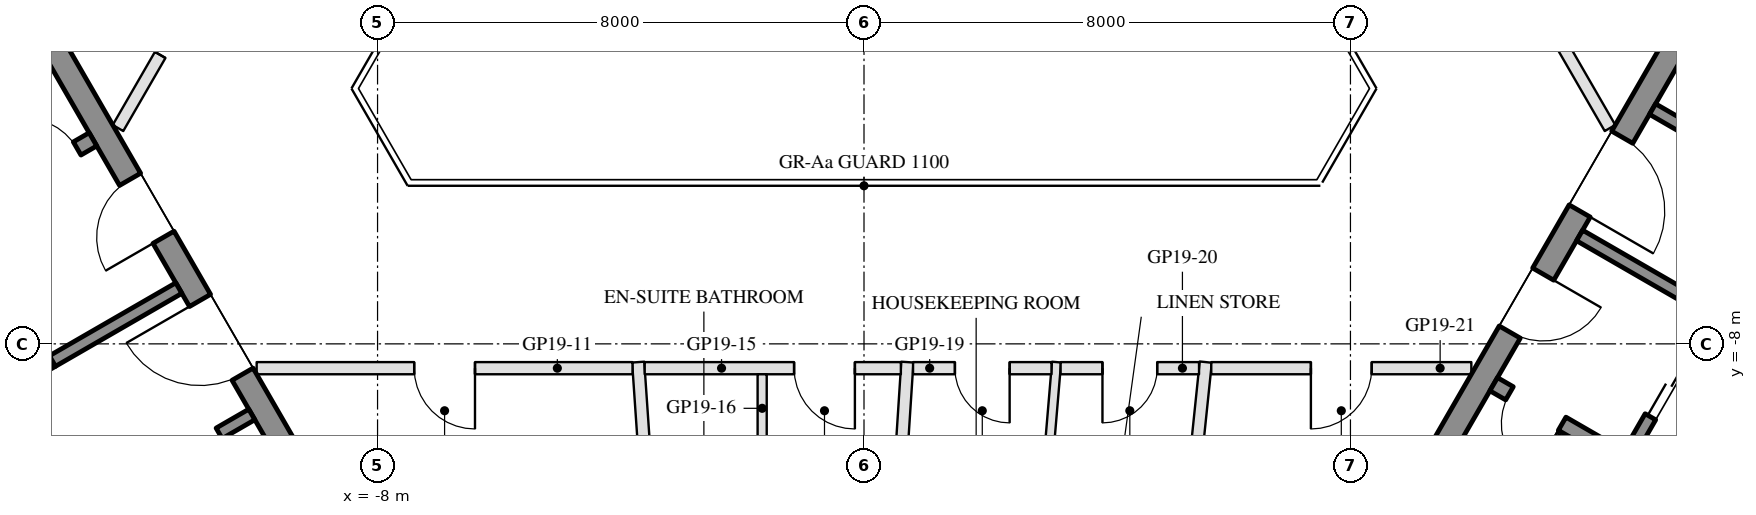
"""IFC4 building model, lengths in metres.
Left out: names, types, materials, properties, quantities, classifications, styles, units other than length and angle.
Written with IfcOpenShell. Run it as: python <this file> out.ifc"""

import sys

from ifc_helpers import new_model, si_unit, direction, frame, frame_2d, origin, place, context, subcontext, project, spatial, rectangle, extrude, element, fill, save


model = new_model("IFC4")
c1 = context("Model", 3, precision=1e-05, world=origin(), true_north=direction((0.0, 1.0)))
c2 = subcontext(c1, "Body", "Model", "MODEL_VIEW")
j1 = project(units=[si_unit("LENGTHUNIT", "METRE"), si_unit("PLANEANGLEUNIT", "RADIAN")], contexts=[c1])
p1 = place(None, origin())
s1 = spatial("IfcSite", under=j1, at=p1, CompositionType="ELEMENT")
p2 = place(p1, origin())
s2 = spatial("IfcBuilding", under=s1, at=p2, CompositionType="ELEMENT")
p3 = place(p2, frame((0.0, 0.0, 202.1)))
s3 = spatial("IfcBuildingStorey", under=s2, at=p3, CompositionType="ELEMENT", Elevation=202.1)
p4 = place(p3, frame((-13.845, -2.22, 0.0), z_axis=(0.0, 0.0, 1.0), x_axis=(0.500004234368, -0.866022959057, 0.0)))
e1 = element("IfcWall", 1, at=p4, inside=s3, PredefinedType="SHEAR", context=c2, shape_type="SweptSolid", body=[
    extrude(rectangle(XDim=10.0, YDim=0.4, at=frame_2d((5.0, 0.0))), origin(), (0.0, 0.0, 1.0), 3.5),
])
p5 = place(p4, frame((3.55, 0.0, 0.0)))
e2 = element("IfcOpeningElement", 2, at=p5, cuts=e1, PredefinedType="OPENING", context=c2, shape_type="SweptSolid", body=[
    extrude(rectangle(XDim=1.1, YDim=2.1, at=frame_2d((0.55, 1.05))), frame((0.0, 0.21, 0.0), z_axis=(0.0, -1.0, 0.0), x_axis=(1.0, 0.0, 0.0)), (0.0, 0.0, 1.0), 0.42),
])
p6 = place(p4, frame((5.85, 0.0, 0.0)))
e3 = element("IfcOpeningElement", 3, at=p6, cuts=e1, PredefinedType="OPENING", context=c2, shape_type="SweptSolid", body=[
    extrude(rectangle(XDim=1.4, YDim=2.1, at=frame_2d((0.7, 1.05))), frame((0.0, 0.21, 0.0), z_axis=(0.0, -1.0, 0.0), x_axis=(1.0, 0.0, 0.0)), (0.0, 0.0, 1.0), 0.42),
])
p7 = place(p3, frame((-12.681, -4.636, 0.0), z_axis=(0.0, 0.0, 1.0), x_axis=(-0.866021702275, -0.500006411147, 0.0)))
e4 = element("IfcWall", 4, at=p7, inside=s3, PredefinedType="SHEAR", context=c2, shape_type="SweptSolid", body=[
    extrude(rectangle(XDim=6.45, YDim=0.25, at=frame_2d((3.225, 0.0))), origin(), (0.0, 0.0, 1.0), 3.5),
])
p8 = place(p7, frame((0.3, 0.0, 0.0)))
e5 = element("IfcOpeningElement", 5, at=p8, cuts=e4, PredefinedType="OPENING", context=c2, shape_type="SweptSolid", body=[
    extrude(rectangle(XDim=1.0, YDim=2.1, at=frame_2d((0.5, 1.05))), frame((0.0, 0.135, 0.0), z_axis=(0.0, -1.0, 0.0), x_axis=(1.0, 0.0, 0.0)), (0.0, 0.0, 1.0), 0.27),
])
p9 = place(p3, frame((-14.783, -5.995, 0.0), z_axis=(0.0, 0.0, 1.0), x_axis=(0.49994636267, -0.866056369097, 0.0)))
e6 = element("IfcWall", 6, at=p9, inside=s3, PredefinedType="SHEAR", context=c2, shape_type="SweptSolid", body=[
    extrude(rectangle(XDim=2.8, YDim=0.2, at=frame_2d((1.4, 0.0))), origin(), (0.0, 0.0, 1.0), 3.5),
])
p10 = place(p9, frame((0.7, 0.0, 0.0)))
e7 = element("IfcOpeningElement", 7, at=p10, cuts=e6, PredefinedType="OPENING", context=c2, shape_type="SweptSolid", body=[
    extrude(rectangle(XDim=1.2, YDim=2.1, at=frame_2d((0.6, 1.05))), frame((0.0, 0.11, 0.0), z_axis=(0.0, -1.0, 0.0), x_axis=(1.0, 0.0, 0.0)), (0.0, 0.0, 1.0), 0.22),
])
p11 = place(p3, frame((-11.268, -7.083, 0.0), z_axis=(0.0, 0.0, 1.0), x_axis=(-0.866050077142, -0.499957262057, 0.0)))
e8 = element("IfcWall", 8, at=p11, inside=s3, PredefinedType="SHEAR", context=c2, shape_type="SweptSolid", body=[
    extrude(rectangle(XDim=2.4, YDim=0.2, at=frame_2d((1.2, 0.0))), origin(), (0.0, 0.0, 1.0), 3.5),
])
p12 = place(p3, frame((-10.068, -9.162, 0.0), z_axis=(0.0, 0.0, 1.0), x_axis=(-0.866032725843, -0.499987317609, 0.0)))
e9 = element("IfcWall", 9, at=p12, inside=s3, PredefinedType="SHEAR", context=c2, shape_type="SweptSolid", body=[
    extrude(rectangle(XDim=10.16, YDim=0.2, at=frame_2d((5.08, 0.0))), origin(), (0.0, 0.0, 1.0), 3.5),
])
p13 = place(p12, frame((0.62, 0.0, 0.0)))
e10 = element("IfcOpeningElement", 10, at=p13, cuts=e9, PredefinedType="OPENING", context=c2, shape_type="SweptSolid", body=[
    extrude(rectangle(XDim=1.1, YDim=2.1, at=frame_2d((0.55, 1.05))), frame((0.0, 0.11, 0.0), z_axis=(0.0, -1.0, 0.0), x_axis=(1.0, 0.0, 0.0)), (0.0, 0.0, 1.0), 0.22),
])
p14 = place(p12, frame((3.16, 0.0, 0.0)))
e11 = element("IfcOpeningElement", 11, at=p14, cuts=e9, PredefinedType="OPENING", context=c2, shape_type="SweptSolid", body=[
    extrude(rectangle(XDim=1.1, YDim=2.1, at=frame_2d((0.55, 1.05))), frame((0.0, 0.11, 0.0), z_axis=(0.0, -1.0, 0.0), x_axis=(1.0, 0.0, 0.0)), (0.0, 0.0, 1.0), 0.22),
])
p15 = place(p12, frame((5.7, 0.0, 0.0)))
e12 = element("IfcOpeningElement", 12, at=p15, cuts=e9, PredefinedType="OPENING", context=c2, shape_type="SweptSolid", body=[
    extrude(rectangle(XDim=1.1, YDim=2.1, at=frame_2d((0.55, 1.05))), frame((0.0, 0.11, 0.0), z_axis=(0.0, -1.0, 0.0), x_axis=(1.0, 0.0, 0.0)), (0.0, 0.0, 1.0), 0.22),
])
p16 = place(p12, frame((8.24, 0.0, 0.0)))
e13 = element("IfcOpeningElement", 13, at=p16, cuts=e9, PredefinedType="OPENING", context=c2, shape_type="SweptSolid", body=[
    extrude(rectangle(XDim=1.1, YDim=2.1, at=frame_2d((0.55, 1.05))), frame((0.0, 0.11, 0.0), z_axis=(0.0, -1.0, 0.0), x_axis=(1.0, 0.0, 0.0)), (0.0, 0.0, 1.0), 0.22),
])
p17 = place(p3, frame((8.845, -10.88, 0.0), z_axis=(0.0, 0.0, 1.0), x_axis=(0.500004234368, 0.866022959057, 0.0)))
e14 = element("IfcWall", 14, at=p17, inside=s3, PredefinedType="SHEAR", context=c2, shape_type="SweptSolid", body=[
    extrude(rectangle(XDim=10.0, YDim=0.4, at=frame_2d((5.0, 0.0))), origin(), (0.0, 0.0, 1.0), 3.5),
])
p18 = place(p17, frame((3.55, 0.0, 0.0)))
e15 = element("IfcOpeningElement", 15, at=p18, cuts=e14, PredefinedType="OPENING", context=c2, shape_type="SweptSolid", body=[
    extrude(rectangle(XDim=1.1, YDim=2.1, at=frame_2d((0.55, 1.05))), frame((0.0, 0.21, 0.0), z_axis=(0.0, -1.0, 0.0), x_axis=(1.0, 0.0, 0.0)), (0.0, 0.0, 1.0), 0.42),
])
p19 = place(p17, frame((5.85, 0.0, 0.0)))
e16 = element("IfcOpeningElement", 16, at=p19, cuts=e14, PredefinedType="OPENING", context=c2, shape_type="SweptSolid", body=[
    extrude(rectangle(XDim=1.4, YDim=2.1, at=frame_2d((0.7, 1.05))), frame((0.0, 0.21, 0.0), z_axis=(0.0, -1.0, 0.0), x_axis=(1.0, 0.0, 0.0)), (0.0, 0.0, 1.0), 0.42),
])
p20 = place(p3, frame((10.356, -8.664, 0.0), z_axis=(0.0, 0.0, 1.0), x_axis=(0.866028629588, -0.499994412703, 0.0)))
e17 = element("IfcWall", 17, at=p20, inside=s3, PredefinedType="SHEAR", context=c2, shape_type="SweptSolid", body=[
    extrude(rectangle(XDim=6.45, YDim=0.25, at=frame_2d((3.225, 0.0))), origin(), (0.0, 0.0, 1.0), 3.5),
])
p21 = place(p20, frame((0.3, 0.0, 0.0)))
e18 = element("IfcOpeningElement", 18, at=p21, cuts=e17, PredefinedType="OPENING", context=c2, shape_type="SweptSolid", body=[
    extrude(rectangle(XDim=1.0, YDim=2.1, at=frame_2d((0.5, 1.05))), frame((0.0, 0.135, 0.0), z_axis=(0.0, -1.0, 0.0), x_axis=(1.0, 0.0, 0.0)), (0.0, 0.0, 1.0), 0.27),
])
p22 = place(p3, frame((12.583, -9.805, 0.0), z_axis=(0.0, 0.0, 1.0), x_axis=(0.49994636267, 0.866056369097, 0.0)))
e19 = element("IfcWall", 19, at=p22, inside=s3, PredefinedType="SHEAR", context=c2, shape_type="SweptSolid", body=[
    extrude(rectangle(XDim=2.8, YDim=0.2, at=frame_2d((1.4, 0.0))), origin(), (0.0, 0.0, 1.0), 3.5),
])
p23 = place(p22, frame((0.7, 0.0, 0.0)))
e20 = element("IfcOpeningElement", 20, at=p23, cuts=e19, PredefinedType="OPENING", context=c2, shape_type="SweptSolid", body=[
    extrude(rectangle(XDim=1.2, YDim=2.1, at=frame_2d((0.6, 1.05))), frame((0.0, 0.11, 0.0), z_axis=(0.0, -1.0, 0.0), x_axis=(1.0, 0.0, 0.0)), (0.0, 0.0, 1.0), 0.22),
])
p24 = place(p3, frame((11.768, -6.217, 0.0), z_axis=(0.0, 0.0, 1.0), x_axis=(0.866050077142, -0.499957262057, 0.0)))
e21 = element("IfcWall", 21, at=p24, inside=s3, PredefinedType="SHEAR", context=c2, shape_type="SweptSolid", body=[
    extrude(rectangle(XDim=2.4, YDim=0.2, at=frame_2d((1.2, 0.0))), origin(), (0.0, 0.0, 1.0), 3.5),
])
p25 = place(p3, frame((12.968, -4.138, 0.0), z_axis=(0.0, 0.0, 1.0), x_axis=(0.866028328073, -0.49999493495, 0.0)))
e22 = element("IfcWall", 22, at=p25, inside=s3, PredefinedType="SHEAR", context=c2, shape_type="SweptSolid", body=[
    extrude(rectangle(XDim=10.16, YDim=0.2, at=frame_2d((5.08, 0.0))), origin(), (0.0, 0.0, 1.0), 3.5),
])
p26 = place(p25, frame((1.99, 0.0, 0.0)))
e23 = element("IfcOpeningElement", 23, at=p26, cuts=e22, PredefinedType="OPENING", context=c2, shape_type="SweptSolid", body=[
    extrude(rectangle(XDim=0.9, YDim=2.1, at=frame_2d((0.45, 1.05))), frame((0.0, 0.11, 0.0), z_axis=(0.0, -1.0, 0.0), x_axis=(1.0, 0.0, 0.0)), (0.0, 0.0, 1.0), 0.22),
])
p27 = place(p25, frame((7.07, 0.0, 0.0)))
e24 = element("IfcOpeningElement", 24, at=p27, cuts=e22, PredefinedType="OPENING", context=c2, shape_type="SweptSolid", body=[
    extrude(rectangle(XDim=0.9, YDim=2.1, at=frame_2d((0.45, 1.05))), frame((0.0, 0.11, 0.0), z_axis=(0.0, -1.0, 0.0), x_axis=(1.0, 0.0, 0.0)), (0.0, 0.0, 1.0), 0.22),
])
p28 = place(p3, frame((-3.022, -18.38, 0.0), z_axis=(0.0, 0.0, 1.0), x_axis=(-0.068480322914, 0.997652467232, 0.0)))
e25 = element("IfcWall", 25, at=p28, inside=s3, PredefinedType="PARTITIONING", context=c2, shape_type="SweptSolid", body=[
    extrude(rectangle(XDim=10.104, YDim=0.2, at=frame_2d((5.052, 0.0))), origin(), (0.0, 0.0, 1.0), 3.06),
])
p29 = place(p3, frame((0.093, -17.855, 0.0), z_axis=(0.0, 0.0, 1.0), x_axis=(0.064789362054, 0.997898962102, 0.0)))
e26 = element("IfcWall", 26, at=p29, inside=s3, PredefinedType="PARTITIONING", context=c2, shape_type="SweptSolid", body=[
    extrude(rectangle(XDim=9.575, YDim=0.2, at=frame_2d((4.788, 0.0))), origin(), (0.0, 0.0, 1.0), 2.95),
])
p30 = place(p3, frame((4.48, -19.28, 0.0), z_axis=(0.0, 0.0, 1.0), x_axis=(0.103348095524, 0.994645248896, 0.0)))
e27 = element("IfcWall", 27, at=p30, inside=s3, PredefinedType="PARTITIONING", context=c2, shape_type="SweptSolid", body=[
    extrude(rectangle(XDim=11.039, YDim=0.2, at=frame_2d((5.52, 0.0))), origin(), (0.0, 0.0, 1.0), 3.06),
])
p31 = place(p3, frame((-3.807, -8.4, 0.0), z_axis=(0.0, 0.0, 1.0), x_axis=(-1.0, 0.0, 0.0)))
e28 = element("IfcWall", 28, at=p31, inside=s3, PredefinedType="PARTITIONING", context=c2, shape_type="SweptSolid", body=[
    extrude(rectangle(XDim=6.181, YDim=0.2, at=frame_2d((3.091, 0.0))), origin(), (0.0, 0.0, 1.0), 2.95),
])
p32 = place(p31, frame((2.591, 0.0, 0.0)))
e29 = element("IfcOpeningElement", 29, at=p32, cuts=e28, PredefinedType="OPENING", context=c2, shape_type="SweptSolid", body=[
    extrude(rectangle(XDim=1.0, YDim=2.1, at=frame_2d((0.5, 1.05))), frame((0.0, 0.11, 0.0), z_axis=(0.0, -1.0, 0.0), x_axis=(1.0, 0.0, 0.0)), (0.0, 0.0, 1.0), 0.22),
])
p33 = place(p3, frame((0.606, -8.4, 0.0), z_axis=(0.0, 0.0, 1.0), x_axis=(-1.0, 0.0, 0.0)))
e30 = element("IfcWall", 30, at=p33, inside=s3, PredefinedType="PARTITIONING", context=c2, shape_type="SweptSolid", body=[
    extrude(rectangle(XDim=4.213, YDim=0.2, at=frame_2d((2.106, 0.0))), origin(), (0.0, 0.0, 1.0), 2.95),
])
p34 = place(p33, frame((0.756, 0.0, 0.0)))
e31 = element("IfcOpeningElement", 31, at=p34, cuts=e30, PredefinedType="OPENING", context=c2, shape_type="SweptSolid", body=[
    extrude(rectangle(XDim=1.0, YDim=2.1, at=frame_2d((0.5, 1.05))), frame((0.0, 0.11, 0.0), z_axis=(0.0, -1.0, 0.0), x_axis=(1.0, 0.0, 0.0)), (0.0, 0.0, 1.0), 0.22),
])
p35 = place(p3, frame((-1.675, -11.3, 0.0), z_axis=(0.0, 0.0, 1.0), x_axis=(0.0, 1.0, 0.0)))
e32 = element("IfcWall", 32, at=p35, inside=s3, PredefinedType="PARTITIONING", context=c2, shape_type="SweptSolid", body=[
    extrude(rectangle(XDim=2.8, YDim=0.15, at=frame_2d((1.4, 0.0))), origin(), (0.0, 0.0, 1.0), 3.55),
])
p36 = place(p35, frame((0.5, 0.0, 0.0)))
e33 = element("IfcOpeningElement", 33, at=p36, cuts=e32, PredefinedType="OPENING", context=c2, shape_type="SweptSolid", body=[
    extrude(rectangle(XDim=0.9, YDim=2.1, at=frame_2d((0.45, 1.05))), frame((0.0, 0.085, 0.0), z_axis=(0.0, -1.0, 0.0), x_axis=(1.0, 0.0, 0.0)), (0.0, 0.0, 1.0), 0.17),
])
p37 = place(p3, frame((2.24, -19.28, 0.0), z_axis=(0.0, 0.0, 1.0), x_axis=(0.084127266942, 0.99645501803, 0.0)))
e34 = element("IfcWall", 34, at=p37, inside=s3, PredefinedType="PARTITIONING", context=c2, shape_type="SweptSolid", body=[
    extrude(rectangle(XDim=11.019, YDim=0.15, at=frame_2d((5.51, 0.0))), origin(), (0.0, 0.0, 1.0), 3.06),
])
p38 = place(p3, frame((3.083, -8.4, 0.0), z_axis=(0.0, 0.0, 1.0), x_axis=(-1.0, 0.0, 0.0)))
e35 = element("IfcWall", 35, at=p38, inside=s3, PredefinedType="PARTITIONING", context=c2, shape_type="SweptSolid", body=[
    extrude(rectangle(XDim=2.277, YDim=0.2, at=frame_2d((1.138, 0.0))), origin(), (0.0, 0.0, 1.0), 3.55),
])
p39 = place(p38, frame((0.688, 0.0, 0.0)))
e36 = element("IfcOpeningElement", 36, at=p39, cuts=e35, PredefinedType="OPENING", context=c2, shape_type="SweptSolid", body=[
    extrude(rectangle(XDim=0.9, YDim=2.1, at=frame_2d((0.45, 1.05))), frame((0.0, 0.11, 0.0), z_axis=(0.0, -1.0, 0.0), x_axis=(1.0, 0.0, 0.0)), (0.0, 0.0, 1.0), 0.22),
])
p40 = place(p3, frame((5.51, -8.4, 0.0), z_axis=(0.0, 0.0, 1.0), x_axis=(-1.0, 0.0, 0.0)))
e37 = element("IfcWall", 37, at=p40, inside=s3, PredefinedType="PARTITIONING", context=c2, shape_type="SweptSolid", body=[
    extrude(rectangle(XDim=2.277, YDim=0.2, at=frame_2d((1.138, 0.0))), origin(), (0.0, 0.0, 1.0), 2.95),
])
p41 = place(p40, frame((0.688, 0.0, 0.0)))
e38 = element("IfcOpeningElement", 38, at=p41, cuts=e37, PredefinedType="OPENING", context=c2, shape_type="SweptSolid", body=[
    extrude(rectangle(XDim=0.9, YDim=2.1, at=frame_2d((0.45, 1.05))), frame((0.0, 0.11, 0.0), z_axis=(0.0, -1.0, 0.0), x_axis=(1.0, 0.0, 0.0)), (0.0, 0.0, 1.0), 0.22),
])
p42 = place(p3, frame((9.988, -8.4, 0.0), z_axis=(0.0, 0.0, 1.0), x_axis=(-1.0, 0.0, 0.0)))
e39 = element("IfcWall", 39, at=p42, inside=s3, PredefinedType="PARTITIONING", context=c2, shape_type="SweptSolid", body=[
    extrude(rectangle(XDim=4.277, YDim=0.2, at=frame_2d((2.139, 0.0))), origin(), (0.0, 0.0, 1.0), 2.95),
])
p43 = place(p42, frame((1.639, 0.0, 0.0)))
e40 = element("IfcOpeningElement", 40, at=p43, cuts=e39, PredefinedType="OPENING", context=c2, shape_type="SweptSolid", body=[
    extrude(rectangle(XDim=1.0, YDim=2.1, at=frame_2d((0.5, 1.05))), frame((0.0, 0.11, 0.0), z_axis=(0.0, -1.0, 0.0), x_axis=(1.0, 0.0, 0.0)), (0.0, 0.0, 1.0), 0.22),
])
p44 = place(p3, frame((10.225, -0.909, 0.0), z_axis=(0.0, 0.0, 1.0), x_axis=(0.500011931275, -0.86601851515, 0.0)))
e41 = element("IfcWall", 41, at=p44, inside=s3, PredefinedType="PARTITIONING", context=c2, shape_type="SweptSolid", body=[
    extrude(rectangle(XDim=4.088, YDim=0.2, at=frame_2d((2.044, 0.0))), origin(), (0.0, 0.0, 1.0), 2.95),
])
p45 = place(p44, frame((1.544, 0.0, 0.0)))
e42 = element("IfcOpeningElement", 42, at=p45, cuts=e41, PredefinedType="OPENING", context=c2, shape_type="SweptSolid", body=[
    extrude(rectangle(XDim=1.0, YDim=2.1, at=frame_2d((0.5, 1.05))), frame((0.0, 0.11, 0.0), z_axis=(0.0, -1.0, 0.0), x_axis=(1.0, 0.0, 0.0)), (0.0, 0.0, 1.0), 0.22),
])
p46 = place(p3, frame((-12.269, -4.45, 0.0), z_axis=(0.0, 0.0, 1.0), x_axis=(0.500019063067, 0.866014397438, 0.0)))
e43 = element("IfcWall", 43, at=p46, inside=s3, PredefinedType="PARTITIONING", context=c2, shape_type="SweptSolid", body=[
    extrude(rectangle(XDim=3.776, YDim=0.2, at=frame_2d((1.888, 0.0))), origin(), (0.0, 0.0, 1.0), 2.95),
])
p47 = place(p46, frame((1.388, 0.0, 0.0)))
e44 = element("IfcOpeningElement", 44, at=p47, cuts=e43, PredefinedType="OPENING", context=c2, shape_type="SweptSolid", body=[
    extrude(rectangle(XDim=1.0, YDim=2.1, at=frame_2d((0.5, 1.05))), frame((0.0, 0.11, 0.0), z_axis=(0.0, -1.0, 0.0), x_axis=(1.0, 0.0, 0.0)), (0.0, 0.0, 1.0), 0.22),
])
p48 = place(p13, origin())
e45 = element("IfcDoor", 45, at=p48, inside=s3, OperationType="DOUBLE_DOOR_SLIDING", PredefinedType="DOOR", context=c2, shape_type="SweptSolid", body=[
    extrude(rectangle(XDim=1.1, YDim=2.1, at=frame_2d((0.55, 1.05))), frame((0.0, 0.025, 0.0), z_axis=(0.0, -1.0, 0.0), x_axis=(1.0, 0.0, 0.0)), (0.0, 0.0, 1.0), 0.05),
])
fill(e10, e45)
p49 = place(p5, frame((1.1, 0.0, 0.0), z_axis=(0.0, 0.0, 1.0), x_axis=(-1.0, 0.0, 0.0)))
e46 = element("IfcDoor", 46, at=p49, inside=s3, OperationType="SINGLE_SWING_LEFT", PredefinedType="DOOR", context=c2, shape_type="SweptSolid", body=[
    extrude(rectangle(XDim=1.1, YDim=2.1, at=frame_2d((0.55, 1.05))), frame((0.0, 0.025, 0.0), z_axis=(0.0, -1.0, 0.0), x_axis=(1.0, 0.0, 0.0)), (0.0, 0.0, 1.0), 0.05),
])
fill(e2, e46)
p50 = place(p6, frame((1.4, 0.0, 0.0), z_axis=(0.0, 0.0, 1.0), x_axis=(-1.0, 0.0, 0.0)))
e47 = element("IfcDoor", 47, at=p50, inside=s3, OperationType="DOUBLE_DOOR_SINGLE_SWING", PredefinedType="DOOR", context=c2, shape_type="SweptSolid", body=[
    extrude(rectangle(XDim=1.4, YDim=2.1, at=frame_2d((0.7, 1.05))), frame((0.0, 0.025, 0.0), z_axis=(0.0, -1.0, 0.0), x_axis=(1.0, 0.0, 0.0)), (0.0, 0.0, 1.0), 0.05),
])
fill(e3, e47)
p51 = place(p8, frame((1.0, 0.0, 0.0), z_axis=(0.0, 0.0, 1.0), x_axis=(-1.0, 0.0, 0.0)))
e48 = element("IfcDoor", 48, at=p51, inside=s3, OperationType="SINGLE_SWING_LEFT", PredefinedType="DOOR", context=c2, shape_type="SweptSolid", body=[
    extrude(rectangle(XDim=1.0, YDim=2.1, at=frame_2d((0.5, 1.05))), frame((0.0, 0.025, 0.0), z_axis=(0.0, -1.0, 0.0), x_axis=(1.0, 0.0, 0.0)), (0.0, 0.0, 1.0), 0.05),
])
fill(e5, e48)
p52 = place(p23, origin())
e49 = element("IfcDoor", 49, at=p52, inside=s3, OperationType="DOUBLE_DOOR_SLIDING", PredefinedType="DOOR", context=c2, shape_type="SweptSolid", body=[
    extrude(rectangle(XDim=1.2, YDim=2.1, at=frame_2d((0.6, 1.05))), frame((0.0, 0.025, 0.0), z_axis=(0.0, -1.0, 0.0), x_axis=(1.0, 0.0, 0.0)), (0.0, 0.0, 1.0), 0.05),
])
fill(e20, e49)
p53 = place(p18, frame((1.1, 0.0, 0.0), z_axis=(0.0, 0.0, 1.0), x_axis=(-1.0, 0.0, 0.0)))
e50 = element("IfcDoor", 50, at=p53, inside=s3, OperationType="SINGLE_SWING_LEFT", PredefinedType="DOOR", context=c2, shape_type="SweptSolid", body=[
    extrude(rectangle(XDim=1.1, YDim=2.1, at=frame_2d((0.55, 1.05))), frame((0.0, 0.025, 0.0), z_axis=(0.0, -1.0, 0.0), x_axis=(1.0, 0.0, 0.0)), (0.0, 0.0, 1.0), 0.05),
])
fill(e15, e50)
p54 = place(p19, frame((1.4, 0.0, 0.0), z_axis=(0.0, 0.0, 1.0), x_axis=(-1.0, 0.0, 0.0)))
e51 = element("IfcDoor", 51, at=p54, inside=s3, OperationType="DOUBLE_DOOR_SINGLE_SWING", PredefinedType="DOOR", context=c2, shape_type="SweptSolid", body=[
    extrude(rectangle(XDim=1.4, YDim=2.1, at=frame_2d((0.7, 1.05))), frame((0.0, 0.025, 0.0), z_axis=(0.0, -1.0, 0.0), x_axis=(1.0, 0.0, 0.0)), (0.0, 0.0, 1.0), 0.05),
])
fill(e16, e51)
p55 = place(p21, frame((1.0, 0.0, 0.0), z_axis=(0.0, 0.0, 1.0), x_axis=(-1.0, 0.0, 0.0)))
e52 = element("IfcDoor", 52, at=p55, inside=s3, OperationType="SINGLE_SWING_LEFT", PredefinedType="DOOR", context=c2, shape_type="SweptSolid", body=[
    extrude(rectangle(XDim=1.0, YDim=2.1, at=frame_2d((0.5, 1.05))), frame((0.0, 0.025, 0.0), z_axis=(0.0, -1.0, 0.0), x_axis=(1.0, 0.0, 0.0)), (0.0, 0.0, 1.0), 0.05),
])
fill(e18, e52)
p56 = place(p32, origin())
e53 = element("IfcDoor", 53, at=p56, inside=s3, OperationType="SINGLE_SWING_LEFT", PredefinedType="DOOR", context=c2, shape_type="SweptSolid", body=[
    extrude(rectangle(XDim=1.0, YDim=2.1, at=frame_2d((0.5, 1.05))), frame((0.0, 0.025, 0.0), z_axis=(0.0, -1.0, 0.0), x_axis=(1.0, 0.0, 0.0)), (0.0, 0.0, 1.0), 0.05),
])
fill(e29, e53)
p57 = place(p34, origin())
e54 = element("IfcDoor", 54, at=p57, inside=s3, OperationType="SINGLE_SWING_LEFT", PredefinedType="DOOR", context=c2, shape_type="SweptSolid", body=[
    extrude(rectangle(XDim=1.0, YDim=2.1, at=frame_2d((0.5, 1.05))), frame((0.0, 0.025, 0.0), z_axis=(0.0, -1.0, 0.0), x_axis=(1.0, 0.0, 0.0)), (0.0, 0.0, 1.0), 0.05),
])
fill(e31, e54)
p58 = place(p39, origin())
e55 = element("IfcDoor", 55, at=p58, inside=s3, OperationType="SINGLE_SWING_LEFT", PredefinedType="DOOR", context=c2, shape_type="SweptSolid", body=[
    extrude(rectangle(XDim=0.9, YDim=2.1, at=frame_2d((0.45, 1.05))), frame((0.0, 0.025, 0.0), z_axis=(0.0, -1.0, 0.0), x_axis=(1.0, 0.0, 0.0)), (0.0, 0.0, 1.0), 0.05),
])
fill(e36, e55)
p59 = place(p41, origin())
e56 = element("IfcDoor", 56, at=p59, inside=s3, OperationType="SINGLE_SWING_RIGHT", PredefinedType="DOOR", context=c2, shape_type="SweptSolid", body=[
    extrude(rectangle(XDim=0.9, YDim=2.1, at=frame_2d((0.45, 1.05))), frame((0.0, 0.025, 0.0), z_axis=(0.0, -1.0, 0.0), x_axis=(1.0, 0.0, 0.0)), (0.0, 0.0, 1.0), 0.05),
])
fill(e38, e56)
p60 = place(p43, origin())
e57 = element("IfcDoor", 57, at=p60, inside=s3, OperationType="SINGLE_SWING_RIGHT", PredefinedType="DOOR", context=c2, shape_type="SweptSolid", body=[
    extrude(rectangle(XDim=1.0, YDim=2.1, at=frame_2d((0.5, 1.05))), frame((0.0, 0.025, 0.0), z_axis=(0.0, -1.0, 0.0), x_axis=(1.0, 0.0, 0.0)), (0.0, 0.0, 1.0), 0.05),
])
fill(e40, e57)
p61 = place(p47, origin())
e58 = element("IfcDoor", 58, at=p61, inside=s3, OperationType="SINGLE_SWING_RIGHT", PredefinedType="DOOR", context=c2, shape_type="SweptSolid", body=[
    extrude(rectangle(XDim=1.0, YDim=2.1, at=frame_2d((0.5, 1.05))), frame((0.0, 0.025, 0.0), z_axis=(0.0, -1.0, 0.0), x_axis=(1.0, 0.0, 0.0)), (0.0, 0.0, 1.0), 0.05),
])
fill(e44, e58)
save(model, sys.argv[1])
